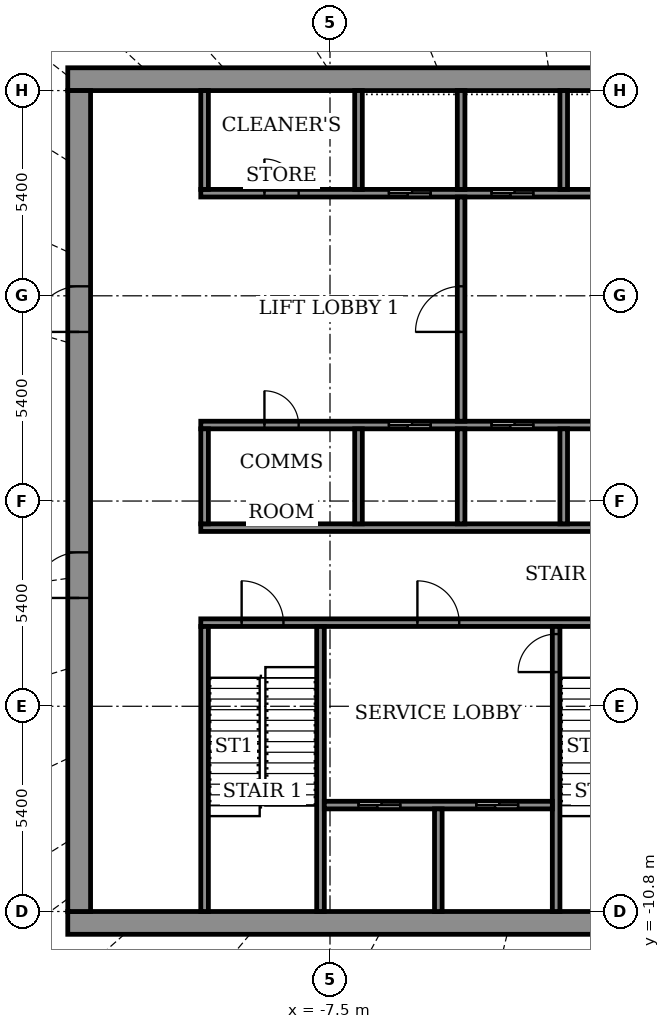
"""IFC4 building model, lengths in metres.
Left out: names, types, materials, properties, quantities, classifications, styles, units other than length and angle.
Written with IfcOpenShell. Run it as: python <this file> out.ifc"""

import sys

from ifc_helpers import new_model, si_unit, direction, frame, frame_2d, origin, place, context, subcontext, project, spatial, rectangle, extrude, element, fill, save


model = new_model("IFC4")
c1 = context("Model", 3, precision=1e-05, world=origin(), true_north=direction((0.0, 1.0)))
c2 = subcontext(c1, "Body", "Model", "MODEL_VIEW")
j1 = project(units=[si_unit("LENGTHUNIT", "METRE"), si_unit("PLANEANGLEUNIT", "RADIAN")], contexts=[c1])
p1 = place(None, origin())
s1 = spatial("IfcSite", under=j1, at=p1, CompositionType="ELEMENT")
p2 = place(p1, origin())
s2 = spatial("IfcBuilding", under=s1, at=p2, CompositionType="ELEMENT")
p3 = place(p2, frame((0.0, 0.0, 301.5)))
s3 = spatial("IfcBuildingStorey", under=s2, at=p3, CompositionType="ELEMENT", Elevation=301.5)
for number, where, z_axis, x_axis in (
    (1, (-14.4, -11.1, 0.0), (0.0, 0.0, 1.0), (1.0, 0.0, 0.0)),
    (2, (-14.4, 11.1, 0.0), (0.0, 0.0, 1.0), (1.0, 0.0, 0.0)),
):
    element("IfcWall", number, at=place(p3, frame(where, z_axis=z_axis, x_axis=x_axis)), inside=s3, PredefinedType="SHEAR", context=c2, shape_type="SweptSolid", body=[
        extrude(rectangle(XDim=28.8, YDim=0.6, at=frame_2d((14.4, 0.0))), origin(), (0.0, 0.0, 1.0), 4.6),
    ])
p4 = place(p3, frame((-14.1, -10.8, 0.0), z_axis=(0.0, 0.0, 1.0), x_axis=(0.0, 1.0, 0.0)))
e3 = element("IfcWall", 3, at=p4, inside=s3, PredefinedType="SHEAR", context=c2, shape_type="SweptSolid", body=[
    extrude(rectangle(XDim=21.6, YDim=0.6, at=frame_2d((10.8, 0.0))), origin(), (0.0, 0.0, 1.0), 4.6),
])
p5 = place(p4, frame((8.25, 0.0, 0.0)))
e4 = element("IfcOpeningElement", 4, at=p5, cuts=e3, PredefinedType="OPENING", context=c2, shape_type="SweptSolid", body=[
    extrude(rectangle(XDim=1.2, YDim=2.1, at=frame_2d((0.6, 1.05))), frame((0.0, 0.31, 0.0), z_axis=(0.0, -1.0, 0.0), x_axis=(1.0, 0.0, 0.0)), (0.0, 0.0, 1.0), 0.62),
])
p6 = place(p4, frame((15.25, 0.0, 0.0)))
e5 = element("IfcOpeningElement", 5, at=p6, cuts=e3, PredefinedType="OPENING", context=c2, shape_type="SweptSolid", body=[
    extrude(rectangle(XDim=1.2, YDim=2.1, at=frame_2d((0.6, 1.05))), frame((0.0, 0.31, 0.0), z_axis=(0.0, -1.0, 0.0), x_axis=(1.0, 0.0, 0.0)), (0.0, 0.0, 1.0), 0.62),
])
p7 = place(p3, frame((-10.9, -3.2, 0.0), z_axis=(0.0, 0.0, 1.0), x_axis=(1.0, 0.0, 0.0)))
e6 = element("IfcWall", 6, at=p7, inside=s3, PredefinedType="SHEAR", context=c2, shape_type="SweptSolid", body=[
    extrude(rectangle(XDim=21.8, YDim=0.2, at=frame_2d((10.9, 0.0))), origin(), (0.0, 0.0, 1.0), 4.05),
])
p8 = place(p7, frame((1.075, 0.0, 0.0)))
e7 = element("IfcOpeningElement", 7, at=p8, cuts=e6, PredefinedType="OPENING", context=c2, shape_type="SweptSolid", body=[
    extrude(rectangle(XDim=1.1, YDim=2.1, at=frame_2d((0.55, 1.05))), frame((0.0, 0.11, 0.0), z_axis=(0.0, -1.0, 0.0), x_axis=(1.0, 0.0, 0.0)), (0.0, 0.0, 1.0), 0.22),
])
p9 = place(p7, frame((10.325, 0.0, 0.0)))
e8 = element("IfcOpeningElement", 8, at=p9, cuts=e6, PredefinedType="OPENING", context=c2, shape_type="SweptSolid", body=[
    extrude(rectangle(XDim=1.1, YDim=2.1, at=frame_2d((0.55, 1.05))), frame((0.0, 0.11, 0.0), z_axis=(0.0, -1.0, 0.0), x_axis=(1.0, 0.0, 0.0)), (0.0, 0.0, 1.0), 0.22),
])
p10 = place(p7, frame((19.625, 0.0, 0.0)))
e9 = element("IfcOpeningElement", 9, at=p10, cuts=e6, PredefinedType="OPENING", context=c2, shape_type="SweptSolid", body=[
    extrude(rectangle(XDim=1.1, YDim=2.1, at=frame_2d((0.55, 1.05))), frame((0.0, 0.11, 0.0), z_axis=(0.0, -1.0, 0.0), x_axis=(1.0, 0.0, 0.0)), (0.0, 0.0, 1.0), 0.22),
])
p11 = place(p7, frame((5.7, 0.0, 0.0)))
e10 = element("IfcOpeningElement", 10, at=p11, cuts=e6, PredefinedType="OPENING", context=c2, shape_type="SweptSolid", body=[
    extrude(rectangle(XDim=1.1, YDim=2.1, at=frame_2d((0.55, 1.05))), frame((0.0, 0.11, 0.0), z_axis=(0.0, -1.0, 0.0), x_axis=(1.0, 0.0, 0.0)), (0.0, 0.0, 1.0), 0.22),
])
p12 = place(p7, frame((14.975, 0.0, 0.0)))
e11 = element("IfcOpeningElement", 11, at=p12, cuts=e6, PredefinedType="OPENING", context=c2, shape_type="SweptSolid", body=[
    extrude(rectangle(XDim=1.1, YDim=2.1, at=frame_2d((0.55, 1.05))), frame((0.0, 0.11, 0.0), z_axis=(0.0, -1.0, 0.0), x_axis=(1.0, 0.0, 0.0)), (0.0, 0.0, 1.0), 0.22),
])
p13 = place(p3, frame((-10.9, -0.7, 0.0), z_axis=(0.0, 0.0, 1.0), x_axis=(1.0, 0.0, 0.0)))
e12 = element("IfcWall", 12, at=p13, inside=s3, PredefinedType="SHEAR", context=c2, shape_type="SweptSolid", body=[
    extrude(rectangle(XDim=21.8, YDim=0.2, at=frame_2d((10.9, 0.0))), origin(), (0.0, 0.0, 1.0), 4.05),
])
p14 = place(p3, frame((-10.9, 2.0, 0.0), z_axis=(0.0, 0.0, 1.0), x_axis=(1.0, 0.0, 0.0)))
e13 = element("IfcWall", 13, at=p14, inside=s3, PredefinedType="SHEAR", context=c2, shape_type="SweptSolid", body=[
    extrude(rectangle(XDim=21.8, YDim=0.2, at=frame_2d((10.9, 0.0))), origin(), (0.0, 0.0, 1.0), 4.05),
])
p15 = place(p14, frame((4.95, 0.0, 0.0)))
e14 = element("IfcOpeningElement", 14, at=p15, cuts=e13, PredefinedType="OPENING", context=c2, shape_type="SweptSolid", body=[
    extrude(rectangle(XDim=1.1, YDim=2.1, at=frame_2d((0.55, 1.05))), frame((0.0, 0.11, 0.0), z_axis=(0.0, -1.0, 0.0), x_axis=(1.0, 0.0, 0.0)), (0.0, 0.0, 1.0), 0.22),
])
p16 = place(p14, frame((7.65, 0.0, 0.0)))
e15 = element("IfcOpeningElement", 15, at=p16, cuts=e13, PredefinedType="OPENING", context=c2, shape_type="SweptSolid", body=[
    extrude(rectangle(XDim=1.1, YDim=2.1, at=frame_2d((0.55, 1.05))), frame((0.0, 0.11, 0.0), z_axis=(0.0, -1.0, 0.0), x_axis=(1.0, 0.0, 0.0)), (0.0, 0.0, 1.0), 0.22),
])
p17 = place(p14, frame((10.35, 0.0, 0.0)))
e16 = element("IfcOpeningElement", 16, at=p17, cuts=e13, PredefinedType="OPENING", context=c2, shape_type="SweptSolid", body=[
    extrude(rectangle(XDim=1.1, YDim=2.1, at=frame_2d((0.55, 1.05))), frame((0.0, 0.11, 0.0), z_axis=(0.0, -1.0, 0.0), x_axis=(1.0, 0.0, 0.0)), (0.0, 0.0, 1.0), 0.22),
])
p18 = place(p14, frame((1.675, 0.0, 0.0)))
e17 = element("IfcOpeningElement", 17, at=p18, cuts=e13, PredefinedType="OPENING", context=c2, shape_type="SweptSolid", body=[
    extrude(rectangle(XDim=0.9, YDim=2.1, at=frame_2d((0.45, 1.05))), frame((0.0, 0.11, 0.0), z_axis=(0.0, -1.0, 0.0), x_axis=(1.0, 0.0, 0.0)), (0.0, 0.0, 1.0), 0.22),
])
p19 = place(p14, frame((13.825, 0.0, 0.0)))
e18 = element("IfcOpeningElement", 18, at=p19, cuts=e13, PredefinedType="OPENING", context=c2, shape_type="SweptSolid", body=[
    extrude(rectangle(XDim=0.9, YDim=2.1, at=frame_2d((0.45, 1.05))), frame((0.0, 0.11, 0.0), z_axis=(0.0, -1.0, 0.0), x_axis=(1.0, 0.0, 0.0)), (0.0, 0.0, 1.0), 0.22),
])
p20 = place(p14, frame((18.55, 0.0, 0.0)))
e19 = element("IfcOpeningElement", 19, at=p20, cuts=e13, PredefinedType="OPENING", context=c2, shape_type="SweptSolid", body=[
    extrude(rectangle(XDim=0.9, YDim=2.1, at=frame_2d((0.45, 1.05))), frame((0.0, 0.11, 0.0), z_axis=(0.0, -1.0, 0.0), x_axis=(1.0, 0.0, 0.0)), (0.0, 0.0, 1.0), 0.22),
])
p21 = place(p3, frame((-10.9, 8.1, 0.0), z_axis=(0.0, 0.0, 1.0), x_axis=(1.0, 0.0, 0.0)))
e20 = element("IfcWall", 20, at=p21, inside=s3, PredefinedType="SHEAR", context=c2, shape_type="SweptSolid", body=[
    extrude(rectangle(XDim=21.8, YDim=0.2, at=frame_2d((10.9, 0.0))), origin(), (0.0, 0.0, 1.0), 4.05),
])
p22 = place(p21, frame((4.95, 0.0, 0.0)))
e21 = element("IfcOpeningElement", 21, at=p22, cuts=e20, PredefinedType="OPENING", context=c2, shape_type="SweptSolid", body=[
    extrude(rectangle(XDim=1.1, YDim=2.1, at=frame_2d((0.55, 1.05))), frame((0.0, 0.11, 0.0), z_axis=(0.0, -1.0, 0.0), x_axis=(1.0, 0.0, 0.0)), (0.0, 0.0, 1.0), 0.22),
])
p23 = place(p21, frame((7.65, 0.0, 0.0)))
e22 = element("IfcOpeningElement", 22, at=p23, cuts=e20, PredefinedType="OPENING", context=c2, shape_type="SweptSolid", body=[
    extrude(rectangle(XDim=1.1, YDim=2.1, at=frame_2d((0.55, 1.05))), frame((0.0, 0.11, 0.0), z_axis=(0.0, -1.0, 0.0), x_axis=(1.0, 0.0, 0.0)), (0.0, 0.0, 1.0), 0.22),
])
p24 = place(p21, frame((10.35, 0.0, 0.0)))
e23 = element("IfcOpeningElement", 23, at=p24, cuts=e20, PredefinedType="OPENING", context=c2, shape_type="SweptSolid", body=[
    extrude(rectangle(XDim=1.1, YDim=2.1, at=frame_2d((0.55, 1.05))), frame((0.0, 0.11, 0.0), z_axis=(0.0, -1.0, 0.0), x_axis=(1.0, 0.0, 0.0)), (0.0, 0.0, 1.0), 0.22),
])
p25 = place(p21, frame((1.675, 0.0, 0.0)))
e24 = element("IfcOpeningElement", 24, at=p25, cuts=e20, PredefinedType="OPENING", context=c2, shape_type="SweptSolid", body=[
    extrude(rectangle(XDim=0.9, YDim=2.1, at=frame_2d((0.45, 1.05))), frame((0.0, 0.11, 0.0), z_axis=(0.0, -1.0, 0.0), x_axis=(1.0, 0.0, 0.0)), (0.0, 0.0, 1.0), 0.22),
])
p26 = place(p21, frame((13.825, 0.0, 0.0)))
e25 = element("IfcOpeningElement", 25, at=p26, cuts=e20, PredefinedType="OPENING", context=c2, shape_type="SweptSolid", body=[
    extrude(rectangle(XDim=0.9, YDim=2.1, at=frame_2d((0.45, 1.05))), frame((0.0, 0.11, 0.0), z_axis=(0.0, -1.0, 0.0), x_axis=(1.0, 0.0, 0.0)), (0.0, 0.0, 1.0), 0.22),
])
p27 = place(p21, frame((18.55, 0.0, 0.0)))
e26 = element("IfcOpeningElement", 26, at=p27, cuts=e20, PredefinedType="OPENING", context=c2, shape_type="SweptSolid", body=[
    extrude(rectangle(XDim=0.9, YDim=2.1, at=frame_2d((0.45, 1.05))), frame((0.0, 0.11, 0.0), z_axis=(0.0, -1.0, 0.0), x_axis=(1.0, 0.0, 0.0)), (0.0, 0.0, 1.0), 0.22),
])
for number, where, z_axis, x_axis in (
    (27, (-10.8, -10.8, 0.0), (0.0, 0.0, 1.0), (0.0, 1.0, 0.0)),
    (28, (-7.75, -10.8, 0.0), (0.0, 0.0, 1.0), (0.0, 1.0, 0.0)),
):
    element("IfcWall", number, at=place(p3, frame(where, z_axis=z_axis, x_axis=x_axis)), inside=s3, PredefinedType="SHEAR", context=c2, shape_type="SweptSolid", body=[
        extrude(rectangle(XDim=7.5, YDim=0.2, at=frame_2d((3.75, 0.0))), origin(), (0.0, 0.0, 1.0), 4.05),
    ])
p28 = place(p3, frame((-1.55, -10.8, 0.0), z_axis=(0.0, 0.0, 1.0), x_axis=(0.0, 1.0, 0.0)))
e29 = element("IfcWall", 29, at=p28, inside=s3, PredefinedType="SHEAR", context=c2, shape_type="SweptSolid", body=[
    extrude(rectangle(XDim=7.5, YDim=0.2, at=frame_2d((3.75, 0.0))), origin(), (0.0, 0.0, 1.0), 4.05),
])
p29 = place(p28, frame((6.3, 0.0, 0.0)))
e30 = element("IfcOpeningElement", 30, at=p29, cuts=e29, PredefinedType="OPENING", context=c2, shape_type="SweptSolid", body=[
    extrude(rectangle(XDim=1.0, YDim=2.1, at=frame_2d((0.5, 1.05))), frame((0.0, 0.11, 0.0), z_axis=(0.0, -1.0, 0.0), x_axis=(1.0, 0.0, 0.0)), (0.0, 0.0, 1.0), 0.22),
])
p30 = place(p3, frame((-7.65, -8.0, 0.0), z_axis=(0.0, 0.0, 1.0), x_axis=(1.0, 0.0, 0.0)))
e31 = element("IfcWall", 31, at=p30, inside=s3, PredefinedType="SHEAR", context=c2, shape_type="SweptSolid", body=[
    extrude(rectangle(XDim=6.0, YDim=0.2, at=frame_2d((3.0, 0.0))), origin(), (0.0, 0.0, 1.0), 4.05),
])
p31 = place(p30, frame((0.9, 0.0, 0.0)))
e32 = element("IfcOpeningElement", 32, at=p31, cuts=e31, PredefinedType="OPENING", context=c2, shape_type="SweptSolid", body=[
    extrude(rectangle(XDim=1.1, YDim=2.1, at=frame_2d((0.55, 1.05))), frame((0.0, 0.11, 0.0), z_axis=(0.0, -1.0, 0.0), x_axis=(1.0, 0.0, 0.0)), (0.0, 0.0, 1.0), 0.22),
])
p32 = place(p30, frame((4.0, 0.0, 0.0)))
e33 = element("IfcOpeningElement", 33, at=p32, cuts=e31, PredefinedType="OPENING", context=c2, shape_type="SweptSolid", body=[
    extrude(rectangle(XDim=1.1, YDim=2.1, at=frame_2d((0.55, 1.05))), frame((0.0, 0.11, 0.0), z_axis=(0.0, -1.0, 0.0), x_axis=(1.0, 0.0, 0.0)), (0.0, 0.0, 1.0), 0.22),
])
p33 = place(p3, frame((-4.65, -10.8, 0.0), z_axis=(0.0, 0.0, 1.0), x_axis=(0.0, 1.0, 0.0)))
e34 = element("IfcWall", 34, at=p33, inside=s3, PredefinedType="SHEAR", context=c2, shape_type="SweptSolid", body=[
    extrude(rectangle(XDim=2.7, YDim=0.2, at=frame_2d((1.35, 0.0))), origin(), (0.0, 0.0, 1.0), 4.05),
])
p34 = place(p3, frame((-10.8, -0.6, 0.0), z_axis=(0.0, 0.0, 1.0), x_axis=(0.0, 1.0, 0.0)))
e35 = element("IfcWall", 35, at=p34, inside=s3, PredefinedType="STANDARD", context=c2, shape_type="SweptSolid", body=[
    extrude(rectangle(XDim=2.5, YDim=0.2, at=frame_2d((1.25, 0.0))), origin(), (0.0, 0.0, 1.0), 4.05),
])
for number, where, z_axis, x_axis in (
    (36, (-6.75, -0.6, 0.0), (0.0, 0.0, 1.0), (0.0, 1.0, 0.0)),
    (37, (-4.05, -0.6, 0.0), (0.0, 0.0, 1.0), (0.0, 1.0, 0.0)),
    (38, (-1.35, -0.6, 0.0), (0.0, 0.0, 1.0), (0.0, 1.0, 0.0)),
):
    element("IfcWall", number, at=place(p3, frame(where, z_axis=z_axis, x_axis=x_axis)), inside=s3, PredefinedType="SHEAR", context=c2, shape_type="SweptSolid", body=[
        extrude(rectangle(XDim=2.5, YDim=0.2, at=frame_2d((1.25, 0.0))), origin(), (0.0, 0.0, 1.0), 4.05),
    ])
p35 = place(p3, frame((-10.8, 8.2, 0.0), z_axis=(0.0, 0.0, 1.0), x_axis=(0.0, 1.0, 0.0)))
e39 = element("IfcWall", 39, at=p35, inside=s3, PredefinedType="STANDARD", context=c2, shape_type="SweptSolid", body=[
    extrude(rectangle(XDim=2.6, YDim=0.2, at=frame_2d((1.3, 0.0))), origin(), (0.0, 0.0, 1.0), 4.05),
])
for number, where, z_axis, x_axis in (
    (40, (-6.75, 8.2, 0.0), (0.0, 0.0, 1.0), (0.0, 1.0, 0.0)),
    (41, (-4.05, 8.2, 0.0), (0.0, 0.0, 1.0), (0.0, 1.0, 0.0)),
    (42, (-1.35, 8.2, 0.0), (0.0, 0.0, 1.0), (0.0, 1.0, 0.0)),
):
    element("IfcWall", number, at=place(p3, frame(where, z_axis=z_axis, x_axis=x_axis)), inside=s3, PredefinedType="SHEAR", context=c2, shape_type="SweptSolid", body=[
        extrude(rectangle(XDim=2.6, YDim=0.2, at=frame_2d((1.3, 0.0))), origin(), (0.0, 0.0, 1.0), 4.05),
    ])
p36 = place(p3, frame((-4.05, 2.1, 0.0), z_axis=(0.0, 0.0, 1.0), x_axis=(0.0, 1.0, 0.0)))
e43 = element("IfcWall", 43, at=p36, inside=s3, PredefinedType="STANDARD", context=c2, shape_type="SweptSolid", body=[
    extrude(rectangle(XDim=5.9, YDim=0.2, at=frame_2d((2.95, 0.0))), origin(), (0.0, 0.0, 1.0), 4.05),
])
p37 = place(p36, frame((2.35, 0.0, 0.0)))
e44 = element("IfcOpeningElement", 44, at=p37, cuts=e43, PredefinedType="OPENING", context=c2, shape_type="SweptSolid", body=[
    extrude(rectangle(XDim=1.2, YDim=2.1, at=frame_2d((0.6, 1.05))), frame((0.0, 0.11, 0.0), z_axis=(0.0, -1.0, 0.0), x_axis=(1.0, 0.0, 0.0)), (0.0, 0.0, 1.0), 0.22),
])
p38 = place(p5, origin())
e45 = element("IfcDoor", 45, at=p38, inside=s3, OperationType="DOUBLE_DOOR_SINGLE_SWING", PredefinedType="DOOR", context=c2, shape_type="SweptSolid", body=[
    extrude(rectangle(XDim=1.2, YDim=2.1, at=frame_2d((0.6, 1.05))), frame((0.0, 0.025, 0.0), z_axis=(0.0, -1.0, 0.0), x_axis=(1.0, 0.0, 0.0)), (0.0, 0.0, 1.0), 0.05),
])
fill(e4, e45)
p39 = place(p6, origin())
e46 = element("IfcDoor", 46, at=p39, inside=s3, OperationType="DOUBLE_DOOR_SINGLE_SWING", PredefinedType="DOOR", context=c2, shape_type="SweptSolid", body=[
    extrude(rectangle(XDim=1.2, YDim=2.1, at=frame_2d((0.6, 1.05))), frame((0.0, 0.025, 0.0), z_axis=(0.0, -1.0, 0.0), x_axis=(1.0, 0.0, 0.0)), (0.0, 0.0, 1.0), 0.05),
])
fill(e5, e46)
p40 = place(p15, origin())
e47 = element("IfcDoor", 47, at=p40, inside=s3, OperationType="SLIDING_TO_LEFT", PredefinedType="DOOR", context=c2, shape_type="SweptSolid", body=[
    extrude(rectangle(XDim=1.1, YDim=2.1, at=frame_2d((0.55, 1.05))), frame((0.0, 0.025, 0.0), z_axis=(0.0, -1.0, 0.0), x_axis=(1.0, 0.0, 0.0)), (0.0, 0.0, 1.0), 0.05),
])
fill(e14, e47)
p41 = place(p16, origin())
e48 = element("IfcDoor", 48, at=p41, inside=s3, OperationType="SLIDING_TO_LEFT", PredefinedType="DOOR", context=c2, shape_type="SweptSolid", body=[
    extrude(rectangle(XDim=1.1, YDim=2.1, at=frame_2d((0.55, 1.05))), frame((0.0, 0.025, 0.0), z_axis=(0.0, -1.0, 0.0), x_axis=(1.0, 0.0, 0.0)), (0.0, 0.0, 1.0), 0.05),
])
fill(e15, e48)
p42 = place(p22, origin())
e49 = element("IfcDoor", 49, at=p42, inside=s3, OperationType="SLIDING_TO_LEFT", PredefinedType="DOOR", context=c2, shape_type="SweptSolid", body=[
    extrude(rectangle(XDim=1.1, YDim=2.1, at=frame_2d((0.55, 1.05))), frame((0.0, 0.025, 0.0), z_axis=(0.0, -1.0, 0.0), x_axis=(1.0, 0.0, 0.0)), (0.0, 0.0, 1.0), 0.05),
])
fill(e21, e49)
p43 = place(p23, origin())
e50 = element("IfcDoor", 50, at=p43, inside=s3, OperationType="SLIDING_TO_LEFT", PredefinedType="DOOR", context=c2, shape_type="SweptSolid", body=[
    extrude(rectangle(XDim=1.1, YDim=2.1, at=frame_2d((0.55, 1.05))), frame((0.0, 0.025, 0.0), z_axis=(0.0, -1.0, 0.0), x_axis=(1.0, 0.0, 0.0)), (0.0, 0.0, 1.0), 0.05),
])
fill(e22, e50)
p44 = place(p18, origin())
e51 = element("IfcDoor", 51, at=p44, inside=s3, OperationType="SINGLE_SWING_LEFT", PredefinedType="DOOR", context=c2, shape_type="SweptSolid", body=[
    extrude(rectangle(XDim=0.9, YDim=2.1, at=frame_2d((0.45, 1.05))), frame((0.0, 0.025, 0.0), z_axis=(0.0, -1.0, 0.0), x_axis=(1.0, 0.0, 0.0)), (0.0, 0.0, 1.0), 0.05),
])
fill(e17, e51)
p45 = place(p25, origin())
e52 = element("IfcDoor", 52, at=p45, inside=s3, OperationType="SINGLE_SWING_RIGHT", PredefinedType="DOOR", context=c2, shape_type="SweptSolid", body=[
    extrude(rectangle(XDim=0.9, YDim=2.1, at=frame_2d((0.45, 1.05))), frame((0.0, 0.025, 0.0), z_axis=(0.0, -1.0, 0.0), x_axis=(1.0, 0.0, 0.0)), (0.0, 0.0, 1.0), 0.05),
])
fill(e24, e52)
p46 = place(p31, origin())
e53 = element("IfcDoor", 53, at=p46, inside=s3, OperationType="SLIDING_TO_LEFT", PredefinedType="DOOR", context=c2, shape_type="SweptSolid", body=[
    extrude(rectangle(XDim=1.1, YDim=2.1, at=frame_2d((0.55, 1.05))), frame((0.0, 0.025, 0.0), z_axis=(0.0, -1.0, 0.0), x_axis=(1.0, 0.0, 0.0)), (0.0, 0.0, 1.0), 0.05),
])
fill(e32, e53)
p47 = place(p32, origin())
e54 = element("IfcDoor", 54, at=p47, inside=s3, OperationType="SLIDING_TO_LEFT", PredefinedType="DOOR", context=c2, shape_type="SweptSolid", body=[
    extrude(rectangle(XDim=1.1, YDim=2.1, at=frame_2d((0.55, 1.05))), frame((0.0, 0.025, 0.0), z_axis=(0.0, -1.0, 0.0), x_axis=(1.0, 0.0, 0.0)), (0.0, 0.0, 1.0), 0.05),
])
fill(e33, e54)
p48 = place(p8, origin())
e55 = element("IfcDoor", 55, at=p48, inside=s3, OperationType="SINGLE_SWING_RIGHT", PredefinedType="DOOR", context=c2, shape_type="SweptSolid", body=[
    extrude(rectangle(XDim=1.1, YDim=2.1, at=frame_2d((0.55, 1.05))), frame((0.0, 0.025, 0.0), z_axis=(0.0, -1.0, 0.0), x_axis=(1.0, 0.0, 0.0)), (0.0, 0.0, 1.0), 0.05),
])
fill(e7, e55)
p49 = place(p11, origin())
e56 = element("IfcDoor", 56, at=p49, inside=s3, OperationType="SINGLE_SWING_LEFT", PredefinedType="DOOR", context=c2, shape_type="SweptSolid", body=[
    extrude(rectangle(XDim=1.1, YDim=2.1, at=frame_2d((0.55, 1.05))), frame((0.0, 0.025, 0.0), z_axis=(0.0, -1.0, 0.0), x_axis=(1.0, 0.0, 0.0)), (0.0, 0.0, 1.0), 0.05),
])
fill(e10, e56)
p50 = place(p29, origin())
e57 = element("IfcDoor", 57, at=p50, inside=s3, OperationType="SINGLE_SWING_RIGHT", PredefinedType="DOOR", context=c2, shape_type="SweptSolid", body=[
    extrude(rectangle(XDim=1.0, YDim=2.1, at=frame_2d((0.5, 1.05))), frame((0.0, 0.025, 0.0), z_axis=(0.0, -1.0, 0.0), x_axis=(1.0, 0.0, 0.0)), (0.0, 0.0, 1.0), 0.05),
])
fill(e30, e57)
p51 = place(p37, origin())
e58 = element("IfcDoor", 58, at=p51, inside=s3, OperationType="SINGLE_SWING_LEFT", PredefinedType="DOOR", context=c2, shape_type="SweptSolid", body=[
    extrude(rectangle(XDim=1.2, YDim=2.1, at=frame_2d((0.6, 1.05))), frame((0.0, 0.025, 0.0), z_axis=(0.0, -1.0, 0.0), x_axis=(1.0, 0.0, 0.0)), (0.0, 0.0, 1.0), 0.05),
])
fill(e44, e58)
save(model, sys.argv[1])
